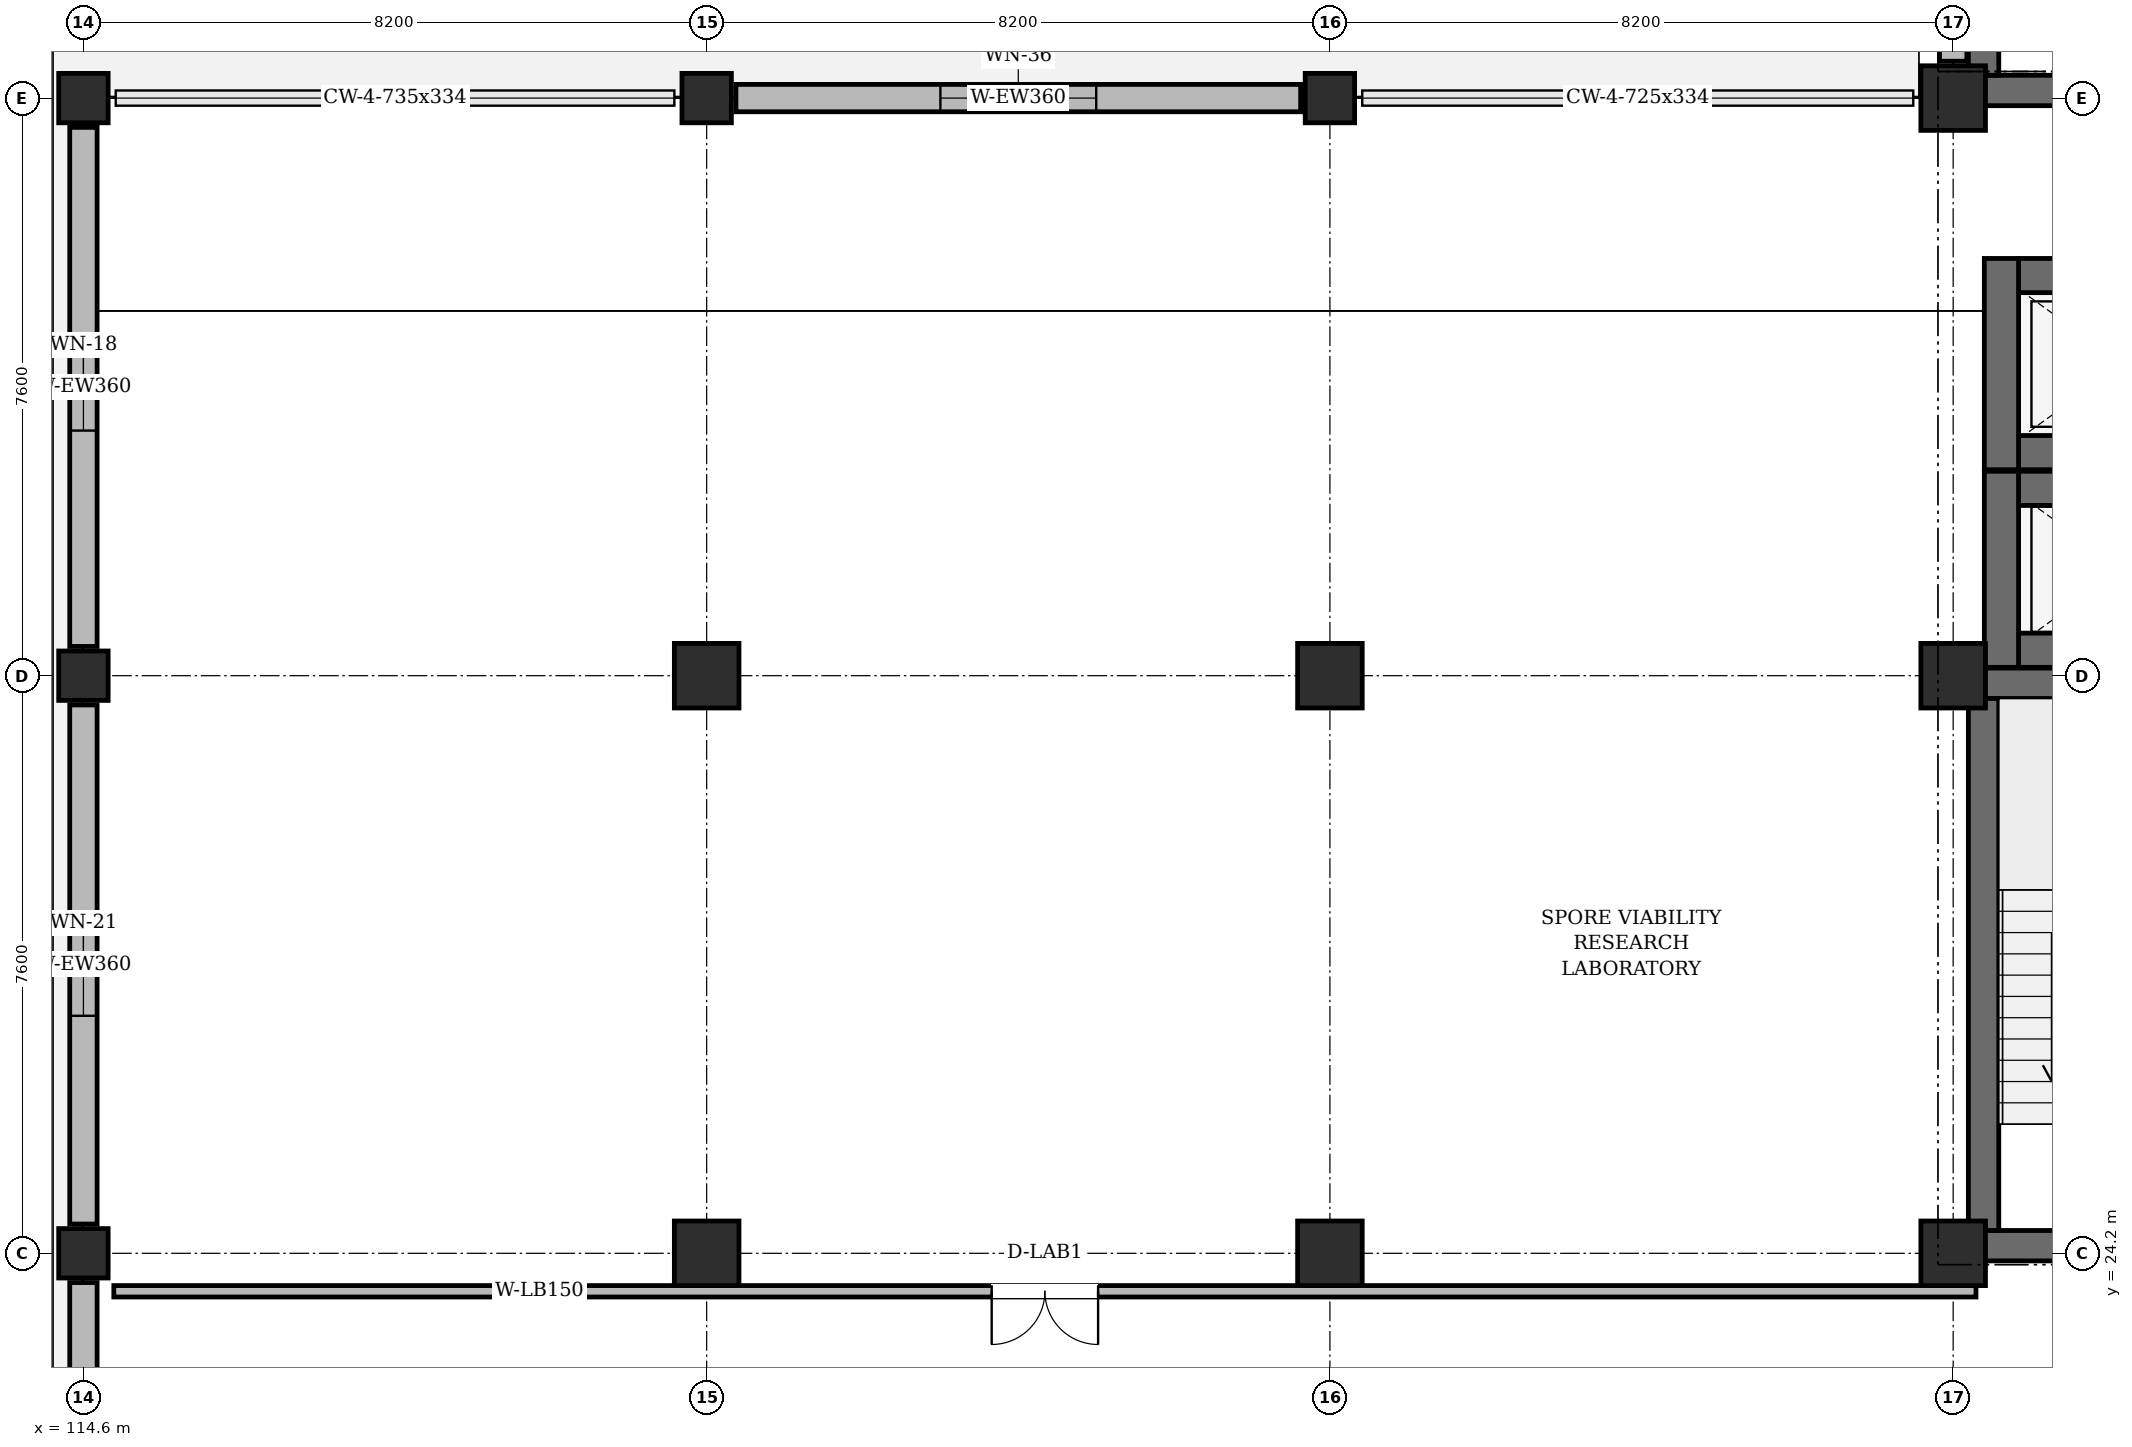
"""IFC4 building model, lengths in metres.
Left out: names, types, materials, properties, quantities, classifications, styles, units other than length and angle.
Written with IfcOpenShell. Run it as: python <this file> out.ifc"""

import sys

from ifc_helpers import new_model, si_unit, direction, frame, frame_2d, origin, origin_2d, place, context, subcontext, project, spatial, rectangle, extrude, element, fill, save


model = new_model("IFC4")
c1 = context("Model", 3, precision=1e-05, world=origin(), true_north=direction((0.0, 1.0)))
c2 = subcontext(c1, "Body", "Model", "MODEL_VIEW")
j1 = project(units=[si_unit("LENGTHUNIT", "METRE"), si_unit("PLANEANGLEUNIT", "RADIAN")], contexts=[c1])
p1 = place(None, origin())
s1 = spatial("IfcSite", under=j1, at=p1, CompositionType="ELEMENT")
p2 = place(p1, origin())
s2 = spatial("IfcBuilding", under=s1, at=p2, CompositionType="ELEMENT")
p3 = place(p2, frame((0.0, 0.0, 19.8)))
s3 = spatial("IfcBuildingStorey", under=s2, at=p3, CompositionType="ELEMENT", Elevation=19.8)
for number, where, z_axis, x_axis in (
    (1, (114.6, 24.2, 0.0), (0.0, 0.0, 1.0), (1.0, 0.0, 0.0)),
    (2, (114.6, 31.8, 0.0), (0.0, 0.0, 1.0), (1.0, 0.0, 0.0)),
    (3, (114.6, 39.4, 0.0), (0.0, 0.0, 1.0), (1.0, 0.0, 0.0)),
):
    element("IfcColumn", number, at=place(p3, frame(where, z_axis=z_axis, x_axis=x_axis)), inside=s3, PredefinedType="COLUMN", context=c2, shape_type="SweptSolid", body=[
        extrude(rectangle(XDim=0.65, YDim=0.65, at=origin_2d()), origin(), (0.0, 0.0, 1.0), 3.94),
    ])
for number, where, z_axis, x_axis in (
    (4, (122.8, 24.2, 0.0), (0.0, 0.0, 1.0), (1.0, 0.0, 0.0)),
    (5, (122.8, 31.8, 0.0), (0.0, 0.0, 1.0), (1.0, 0.0, 0.0)),
):
    element("IfcColumn", number, at=place(p3, frame(where, z_axis=z_axis, x_axis=x_axis)), inside=s3, PredefinedType="COLUMN", context=c2, shape_type="SweptSolid", body=[
        extrude(rectangle(XDim=0.85, YDim=0.85, at=origin_2d()), origin(), (0.0, 0.0, 1.0), 3.94),
    ])
p4 = place(p3, frame((122.8, 39.4, 0.0), z_axis=(0.0, 0.0, 1.0), x_axis=(1.0, 0.0, 0.0)))
e6 = element("IfcColumn", 6, at=p4, inside=s3, PredefinedType="COLUMN", context=c2, shape_type="SweptSolid", body=[
    extrude(rectangle(XDim=0.65, YDim=0.65, at=origin_2d()), origin(), (0.0, 0.0, 1.0), 3.94),
])
for number, where, z_axis, x_axis in (
    (7, (131.0, 24.2, 0.0), (0.0, 0.0, 1.0), (1.0, 0.0, 0.0)),
    (8, (131.0, 31.8, 0.0), (0.0, 0.0, 1.0), (1.0, 0.0, 0.0)),
):
    element("IfcColumn", number, at=place(p3, frame(where, z_axis=z_axis, x_axis=x_axis)), inside=s3, PredefinedType="COLUMN", context=c2, shape_type="SweptSolid", body=[
        extrude(rectangle(XDim=0.85, YDim=0.85, at=origin_2d()), origin(), (0.0, 0.0, 1.0), 3.94),
    ])
p5 = place(p3, frame((131.0, 39.4, 0.0), z_axis=(0.0, 0.0, 1.0), x_axis=(1.0, 0.0, 0.0)))
e9 = element("IfcColumn", 9, at=p5, inside=s3, PredefinedType="COLUMN", context=c2, shape_type="SweptSolid", body=[
    extrude(rectangle(XDim=0.65, YDim=0.65, at=origin_2d()), origin(), (0.0, 0.0, 1.0), 3.94),
])
for number, where, z_axis, x_axis in (
    (10, (139.2, 24.2, 0.0), (0.0, 0.0, 1.0), (1.0, 0.0, 0.0)),
    (11, (139.2, 31.8, 0.0), (0.0, 0.0, 1.0), (1.0, 0.0, 0.0)),
    (12, (139.2, 39.4, 0.0), (0.0, 0.0, 1.0), (1.0, 0.0, 0.0)),
):
    element("IfcColumn", number, at=place(p3, frame(where, z_axis=z_axis, x_axis=x_axis)), inside=s3, PredefinedType="COLUMN", context=c2, shape_type="SweptSolid", body=[
        extrude(rectangle(XDim=0.85, YDim=0.85, at=origin_2d()), origin(), (0.0, 0.0, 1.0), 3.94),
    ])
p6 = place(p3, frame((139.2, 46.515, 0.0), z_axis=(0.0, 0.0, 1.0), x_axis=(0.0, -1.0, 0.0)))
e13 = element("IfcWall", 13, at=p6, inside=s3, PredefinedType="SOLIDWALL", context=c2, shape_type="SweptSolid", body=[
    extrude(rectangle(XDim=6.63, YDim=0.36, at=frame_2d((3.315, 0.0))), origin(), (0.0, 0.0, 1.0), 3.325),
])
p7 = place(p3, frame((130.615, 39.4, 0.0), z_axis=(0.0, 0.0, 1.0), x_axis=(-1.0, 0.0, 0.0)))
e14 = element("IfcWall", 14, at=p7, inside=s3, PredefinedType="SOLIDWALL", context=c2, shape_type="SweptSolid", body=[
    extrude(rectangle(XDim=7.43, YDim=0.36, at=frame_2d((3.715, 0.0))), origin(), (0.0, 0.0, 1.0), 3.325),
])
p8 = place(p7, frame((2.69, 0.0, 0.95)))
e15 = element("IfcOpeningElement", 15, at=p8, cuts=e14, PredefinedType="OPENING", context=c2, shape_type="SweptSolid", body=[
    extrude(rectangle(XDim=2.05, YDim=2.05, at=frame_2d((1.025, 1.025))), frame((0.0, 0.192, 0.0), z_axis=(0.0, -1.0, 0.0), x_axis=(1.0, 0.0, 0.0)), (0.0, 0.0, 1.0), 0.384),
])
p9 = place(p3, frame((114.6, 39.015, 0.0), z_axis=(0.0, 0.0, 1.0), x_axis=(0.0, -1.0, 0.0)))
e16 = element("IfcWall", 16, at=p9, inside=s3, PredefinedType="SOLIDWALL", context=c2, shape_type="SweptSolid", body=[
    extrude(rectangle(XDim=6.83, YDim=0.36, at=frame_2d((3.415, 0.0))), origin(), (0.0, 0.0, 1.0), 3.325),
])
p10 = place(p9, frame((2.84, 0.0, 0.95)))
e17 = element("IfcOpeningElement", 17, at=p10, cuts=e16, PredefinedType="OPENING", context=c2, shape_type="SweptSolid", body=[
    extrude(rectangle(XDim=1.15, YDim=1.5, at=frame_2d((0.575, 0.75))), frame((0.0, 0.192, 0.0), z_axis=(0.0, -1.0, 0.0), x_axis=(1.0, 0.0, 0.0)), (0.0, 0.0, 1.0), 0.384),
])
p11 = place(p3, frame((114.6, 31.415, 0.0), z_axis=(0.0, 0.0, 1.0), x_axis=(0.0, -1.0, 0.0)))
e18 = element("IfcWall", 18, at=p11, inside=s3, PredefinedType="SOLIDWALL", context=c2, shape_type="SweptSolid", body=[
    extrude(rectangle(XDim=6.83, YDim=0.36, at=frame_2d((3.415, 0.0))), origin(), (0.0, 0.0, 1.0), 3.325),
])
p12 = place(p11, frame((2.74, 0.0, 0.95)))
e19 = element("IfcOpeningElement", 19, at=p12, cuts=e18, PredefinedType="OPENING", context=c2, shape_type="SweptSolid", body=[
    extrude(rectangle(XDim=1.35, YDim=1.25, at=frame_2d((0.675, 0.625))), frame((0.0, 0.192, 0.0), z_axis=(0.0, -1.0, 0.0), x_axis=(1.0, 0.0, 0.0)), (0.0, 0.0, 1.0), 0.384),
])
p13 = place(p3, frame((114.6, 23.815, 0.0), z_axis=(0.0, 0.0, 1.0), x_axis=(0.0, -1.0, 0.0)))
e20 = element("IfcWall", 20, at=p13, inside=s3, PredefinedType="SOLIDWALL", context=c2, shape_type="SweptSolid", body=[
    extrude(rectangle(XDim=6.83, YDim=0.36, at=frame_2d((3.415, 0.0))), origin(), (0.0, 0.0, 1.0), 3.325),
])
p14 = place(p13, frame((2.74, 0.0, 0.95)))
e21 = element("IfcOpeningElement", 21, at=p14, cuts=e20, PredefinedType="OPENING", context=c2, shape_type="SweptSolid", body=[
    extrude(rectangle(XDim=1.35, YDim=2.05, at=frame_2d((0.675, 1.025))), frame((0.0, 0.192, 0.0), z_axis=(0.0, -1.0, 0.0), x_axis=(1.0, 0.0, 0.0)), (0.0, 0.0, 1.0), 0.384),
])
p15 = place(p3, frame((139.4, 24.3, 0.0), z_axis=(0.0, 0.0, 1.0), x_axis=(1.0, 0.0, 0.0)))
e22 = element("IfcWall", 22, at=p15, inside=s3, PredefinedType="SHEAR", context=c2, shape_type="SweptSolid", body=[
    extrude(rectangle(XDim=3.8, YDim=0.4, at=frame_2d((1.9, 0.0))), origin(), (0.0, 0.0, 1.0), 3.94),
])
p16 = place(p15, frame((1.3, 0.0, 0.0)))
e23 = element("IfcOpeningElement", 23, at=p16, cuts=e22, PredefinedType="OPENING", context=c2, shape_type="SweptSolid", body=[
    extrude(rectangle(XDim=1.2, YDim=2.2, at=frame_2d((0.6, 1.1))), frame((0.0, 0.212, 0.0), z_axis=(0.0, -1.0, 0.0), x_axis=(1.0, 0.0, 0.0)), (0.0, 0.0, 1.0), 0.424),
])
p17 = place(p3, frame((139.4, 31.7, 0.0), z_axis=(0.0, 0.0, 1.0), x_axis=(1.0, 0.0, 0.0)))
e24 = element("IfcWall", 24, at=p17, inside=s3, PredefinedType="SHEAR", context=c2, shape_type="SweptSolid", body=[
    extrude(rectangle(XDim=3.8, YDim=0.4, at=frame_2d((1.9, 0.0))), origin(), (0.0, 0.0, 1.0), 3.94),
])
p18 = place(p3, frame((139.6, 24.5, 0.0), z_axis=(0.0, 0.0, 1.0), x_axis=(0.0, 1.0, 0.0)))
e25 = element("IfcWall", 25, at=p18, inside=s3, PredefinedType="SHEAR", context=c2, shape_type="SweptSolid", body=[
    extrude(rectangle(XDim=7.0, YDim=0.4, at=frame_2d((3.5, 0.0))), origin(), (0.0, 0.0, 1.0), 3.94),
])
p19 = place(p3, frame((139.4, 39.5, 0.0), z_axis=(0.0, 0.0, 1.0), x_axis=(1.0, 0.0, 0.0)))
e26 = element("IfcWall", 26, at=p19, inside=s3, PredefinedType="SHEAR", context=c2, shape_type="SweptSolid", body=[
    extrude(rectangle(XDim=3.8, YDim=0.4, at=frame_2d((1.9, 0.0))), origin(), (0.0, 0.0, 1.0), 3.94),
])
p20 = place(p19, frame((1.3, 0.0, 0.0)))
e27 = element("IfcOpeningElement", 27, at=p20, cuts=e26, PredefinedType="OPENING", context=c2, shape_type="SweptSolid", body=[
    extrude(rectangle(XDim=1.2, YDim=2.2, at=frame_2d((0.6, 1.1))), frame((0.0, 0.212, 0.0), z_axis=(0.0, -1.0, 0.0), x_axis=(1.0, 0.0, 0.0)), (0.0, 0.0, 1.0), 0.424),
])
p21 = place(p3, frame((139.6, 39.7, 0.0), z_axis=(0.0, 0.0, 1.0), x_axis=(0.0, 1.0, 0.0)))
e28 = element("IfcWall", 28, at=p21, inside=s3, PredefinedType="SHEAR", context=c2, shape_type="SweptSolid", body=[
    extrude(rectangle(XDim=7.0, YDim=0.4, at=frame_2d((3.5, 0.0))), origin(), (0.0, 0.0, 1.0), 3.94),
])
for number, where, z_axis, x_axis in (
    (29, (140.06, 32.135, 0.0), (0.0, 0.0, 1.0), (1.0, 0.0, 0.0)),
    (30, (140.06, 34.265, 0.0), (0.0, 0.0, 1.0), (1.0, 0.0, 0.0)),
):
    element("IfcWall", number, at=place(p3, frame(where, z_axis=z_axis, x_axis=x_axis)), inside=s3, PredefinedType="SHEAR", context=c2, shape_type="SweptSolid", body=[
        extrude(rectangle(XDim=2.74, YDim=0.45, at=frame_2d((1.37, 0.0))), origin(), (0.0, 0.0, 1.0), 3.94),
    ])
p22 = place(p3, frame((139.835, 31.91, 0.0), z_axis=(0.0, 0.0, 1.0), x_axis=(0.0, 1.0, 0.0)))
e31 = element("IfcWall", 31, at=p22, inside=s3, PredefinedType="SHEAR", context=c2, shape_type="SweptSolid", body=[
    extrude(rectangle(XDim=2.58, YDim=0.45, at=frame_2d((1.29, 0.0))), origin(), (0.0, 0.0, 1.0), 3.94),
])
for number, where, z_axis, x_axis in (
    (32, (140.06, 34.735, 0.0), (0.0, 0.0, 1.0), (1.0, 0.0, 0.0)),
    (33, (140.06, 37.065, 0.0), (0.0, 0.0, 1.0), (1.0, 0.0, 0.0)),
):
    element("IfcWall", number, at=place(p3, frame(where, z_axis=z_axis, x_axis=x_axis)), inside=s3, PredefinedType="SHEAR", context=c2, shape_type="SweptSolid", body=[
        extrude(rectangle(XDim=2.74, YDim=0.45, at=frame_2d((1.37, 0.0))), origin(), (0.0, 0.0, 1.0), 3.94),
    ])
p23 = place(p3, frame((139.835, 34.51, 0.0), z_axis=(0.0, 0.0, 1.0), x_axis=(0.0, 1.0, 0.0)))
e34 = element("IfcWall", 34, at=p23, inside=s3, PredefinedType="SHEAR", context=c2, shape_type="SweptSolid", body=[
    extrude(rectangle(XDim=2.78, YDim=0.45, at=frame_2d((1.39, 0.0))), origin(), (0.0, 0.0, 1.0), 3.94),
])
p24 = place(p3, frame((115.0, 23.7, 0.0), z_axis=(0.0, 0.0, 1.0), x_axis=(1.0, 0.0, 0.0)))
e35 = element("IfcWall", 35, at=p24, inside=s3, PredefinedType="PARTITIONING", context=c2, shape_type="SweptSolid", body=[
    extrude(rectangle(XDim=24.5, YDim=0.15, at=frame_2d((12.25, 0.0))), origin(), (0.0, 0.0, 1.0), 3.805),
])
p25 = place(p24, frame((11.55, 0.0, 0.0)))
e36 = element("IfcOpeningElement", 36, at=p25, cuts=e35, PredefinedType="OPENING", context=c2, shape_type="SweptSolid", body=[
    extrude(rectangle(XDim=1.4, YDim=2.2, at=frame_2d((0.7, 1.1))), frame((0.0, 0.087, 0.0), z_axis=(0.0, -1.0, 0.0), x_axis=(1.0, 0.0, 0.0)), (0.0, 0.0, 1.0), 0.174),
])
p26 = place(p8, origin())
e37 = element("IfcWindow", 37, at=p26, inside=s3, PartitioningType="DOUBLE_PANEL_VERTICAL", PredefinedType="WINDOW", context=c2, shape_type="SweptSolid", body=[
    extrude(rectangle(XDim=2.05, YDim=2.05, at=frame_2d((1.025, 1.025))), frame((0.0, 0.03, 0.0), z_axis=(0.0, -1.0, 0.0), x_axis=(1.0, 0.0, 0.0)), (0.0, 0.0, 1.0), 0.06),
])
fill(e15, e37)
p27 = place(p10, origin())
e38 = element("IfcWindow", 38, at=p27, inside=s3, PartitioningType="SINGLE_PANEL", PredefinedType="WINDOW", context=c2, shape_type="SweptSolid", body=[
    extrude(rectangle(XDim=1.15, YDim=1.5, at=frame_2d((0.575, 0.75))), frame((0.0, 0.03, 0.0), z_axis=(0.0, -1.0, 0.0), x_axis=(1.0, 0.0, 0.0)), (0.0, 0.0, 1.0), 0.06),
])
fill(e17, e38)
p28 = place(p12, origin())
e39 = element("IfcWindow", 39, at=p28, inside=s3, PartitioningType="SINGLE_PANEL", PredefinedType="WINDOW", context=c2, shape_type="SweptSolid", body=[
    extrude(rectangle(XDim=1.35, YDim=1.25, at=frame_2d((0.675, 0.625))), frame((0.0, 0.03, 0.0), z_axis=(0.0, -1.0, 0.0), x_axis=(1.0, 0.0, 0.0)), (0.0, 0.0, 1.0), 0.06),
])
fill(e19, e39)
p29 = place(p25, frame((1.4, 0.0, 0.0), z_axis=(0.0, 0.0, 1.0), x_axis=(-1.0, 0.0, 0.0)))
e40 = element("IfcDoor", 40, at=p29, inside=s3, OperationType="DOUBLE_DOOR_SINGLE_SWING", PredefinedType="DOOR", context=c2, shape_type="SweptSolid", body=[
    extrude(rectangle(XDim=1.4, YDim=2.2, at=frame_2d((0.7, 1.1))), frame((0.0, 0.025, 0.0), z_axis=(0.0, -1.0, 0.0), x_axis=(1.0, 0.0, 0.0)), (0.0, 0.0, 1.0), 0.05),
])
fill(e36, e40)
save(model, sys.argv[1])
